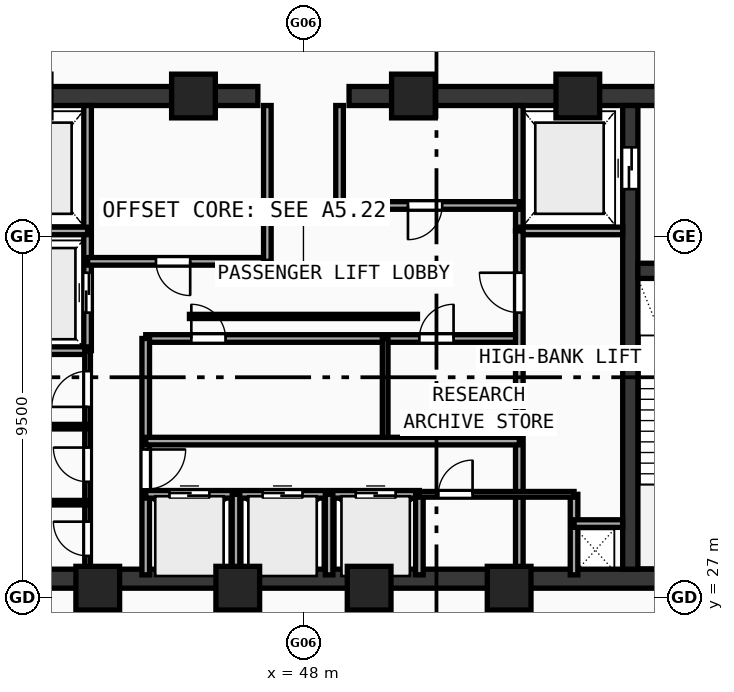
"""IFC4 building model, lengths in metres.
Left out: names, types, materials, properties, quantities, classifications, styles, units other than length and angle.
Written with IfcOpenShell. Run it as: python <this file> out.ifc"""

import sys

from ifc_helpers import new_model, si_unit, direction, frame, frame_2d, origin, origin_with_axes, origin_2d, place, context, subcontext, project, spatial, rectangle, hollow_rectangle, extrude, source, transform, mapped, element, fill, save


model = new_model("IFC4")
c1 = context("Model", 3, precision=1e-05, world=origin(), true_north=direction((0.0, 1.0)))
c2 = subcontext(c1, "Body", "Model", "MODEL_VIEW")
j1 = project(units=[si_unit("LENGTHUNIT", "METRE"), si_unit("PLANEANGLEUNIT", "RADIAN")], contexts=[c1])
p1 = place(None, origin())
s1 = spatial("IfcSite", under=j1, at=p1, CompositionType="ELEMENT")
p2 = place(p1, origin())
s2 = spatial("IfcBuilding", under=s1, at=p2, CompositionType="ELEMENT")
p3 = place(p2, frame((0.0, 0.0, 366.76)))
s3 = spatial("IfcBuildingStorey", under=s2, at=p3, CompositionType="ELEMENT", Elevation=366.76)
p4 = place(p3, frame((35.55, 27.5, 0.0), z_axis=(0.0, 0.0, 1.0), x_axis=(1.0, 0.0, 0.0)))
e1 = element("IfcWall", 1, at=p4, inside=s3, PredefinedType="SHEAR", context=c2, shape_type="SweptSolid", body=[
    extrude(rectangle(XDim=24.9, YDim=0.5, at=frame_2d((12.45, 0.0))), origin(), (0.0, 0.0, 1.0), 4.72),
])
p5 = place(p3, frame((35.55, 40.2, 0.0), z_axis=(0.0, 0.0, 1.0), x_axis=(1.0, 0.0, 0.0)))
e2 = element("IfcWall", 2, at=p5, inside=s3, PredefinedType="SHEAR", context=c2, shape_type="SweptSolid", body=[
    extrude(rectangle(XDim=11.25, YDim=0.5, at=frame_2d((5.625, 0.0))), origin(), (0.0, 0.0, 1.0), 4.72),
])
p6 = place(p5, frame((1.6, 0.0, 0.0)))
e3 = element("IfcOpeningElement", 3, at=p6, cuts=e2, PredefinedType="OPENING", context=c2, shape_type="SweptSolid", body=[
    extrude(rectangle(XDim=1.05, YDim=2.1, at=frame_2d((0.525, 1.05))), frame((0.0, 0.26, 0.0), z_axis=(0.0, -1.0, 0.0), x_axis=(1.0, 0.0, 0.0)), (0.0, 0.0, 1.0), 0.52),
])
p7 = place(p3, frame((49.2, 40.2, 0.0), z_axis=(0.0, 0.0, 1.0), x_axis=(1.0, 0.0, 0.0)))
e4 = element("IfcWall", 4, at=p7, inside=s3, PredefinedType="SHEAR", context=c2, shape_type="SweptSolid", body=[
    extrude(rectangle(XDim=11.25, YDim=0.5, at=frame_2d((5.625, 0.0))), origin(), (0.0, 0.0, 1.0), 4.72),
])
p8 = place(p7, frame((8.6, 0.0, 0.0)))
e5 = element("IfcOpeningElement", 5, at=p8, cuts=e4, PredefinedType="OPENING", context=c2, shape_type="SweptSolid", body=[
    extrude(rectangle(XDim=1.05, YDim=2.1, at=frame_2d((0.525, 1.05))), frame((0.0, 0.26, 0.0), z_axis=(0.0, -1.0, 0.0), x_axis=(1.0, 0.0, 0.0)), (0.0, 0.0, 1.0), 0.52),
])
p9 = place(p3, frame((56.6, 27.75, 0.0), z_axis=(0.0, 0.0, 1.0), x_axis=(0.0, 1.0, 0.0)))
e6 = element("IfcWall", 6, at=p9, inside=s3, PredefinedType="SHEAR", context=c2, shape_type="SweptSolid", body=[
    extrude(rectangle(XDim=12.2, YDim=0.4, at=frame_2d((6.1, 0.0))), origin(), (0.0, 0.0, 1.0), 4.72),
])
p10 = place(p9, frame((10.0, 0.0, 0.0)))
e7 = element("IfcOpeningElement", 7, at=p10, cuts=e6, PredefinedType="OPENING", context=c2, shape_type="SweptSolid", body=[
    extrude(rectangle(XDim=1.1, YDim=2.1, at=frame_2d((0.55, 1.05))), frame((0.0, 0.21, 0.0), z_axis=(0.0, -1.0, 0.0), x_axis=(1.0, 0.0, 0.0)), (0.0, 0.0, 1.0), 0.42),
])
p11 = place(p3, frame((56.8, 35.6, 0.0), z_axis=(0.0, 0.0, 1.0), x_axis=(1.0, 0.0, 0.0)))
e8 = element("IfcWall", 8, at=p11, inside=s3, PredefinedType="SHEAR", context=c2, shape_type="SweptSolid", body=[
    extrude(rectangle(XDim=3.15, YDim=0.4, at=frame_2d((1.575, 0.0))), origin(), (0.0, 0.0, 1.0), 4.72),
])
p12 = place(p11, frame((1.02, 0.0, 0.0)))
e9 = element("IfcOpeningElement", 9, at=p12, cuts=e8, PredefinedType="OPENING", context=c2, shape_type="SweptSolid", body=[
    extrude(rectangle(XDim=1.05, YDim=2.1, at=frame_2d((0.525, 1.05))), frame((0.0, 0.21, 0.0), z_axis=(0.0, -1.0, 0.0), x_axis=(1.0, 0.0, 0.0)), (0.0, 0.0, 1.0), 0.42),
])
m1 = source(origin(), c2, "Body", "SweptSolid", [
    extrude(hollow_rectangle(XDim=1.15, YDim=1.15, WallThickness=0.048, at=origin_2d()), origin(), (0.0, 0.0, 1.0), 5.0),
])
for number, where, z_axis, x_axis in (
    (10, (42.588, 27.25, -0.28), (0.0, 0.0, 1.0), (1.0, 0.0, 0.0)),
    (11, (46.272, 27.25, -0.28), (0.0, 0.0, 1.0), (1.0, 0.0, 0.0)),
    (12, (49.729, 27.25, -0.28), (0.0, 0.0, 1.0), (1.0, 0.0, 0.0)),
    (13, (53.412, 27.25, -0.28), (0.0, 0.0, 1.0), (1.0, 0.0, 0.0)),
    (14, (55.219, 40.2, -0.28), (0.0, 0.0, 1.0), (1.0, 0.0, 0.0)),
    (15, (50.894, 40.2, -0.28), (0.0, 0.0, 1.0), (1.0, 0.0, 0.0)),
    (16, (45.106, 40.2, -0.28), (0.0, 0.0, 1.0), (1.0, 0.0, 0.0)),
):
    element("IfcColumn", number, at=place(p3, frame(where, z_axis=z_axis, x_axis=x_axis)), inside=s3, PredefinedType="COLUMN", context=c2, shape_type="MappedRepresentation", body=[
        mapped(m1, transform((0.0, 0.0, 0.0), scale=1.0)),
    ])
p13 = place(p3, frame((42.32, 33.5, 0.0), z_axis=(0.0, 0.0, 1.0), x_axis=(0.0, 1.0, 0.0)))
e17 = element("IfcWall", 17, at=p13, inside=s3, PredefinedType="SOLIDWALL", context=c2, shape_type="SweptSolid", body=[
    extrude(rectangle(XDim=6.45, YDim=0.2, at=frame_2d((3.225, 0.0))), origin(), (0.0, 0.0, 1.0), 4.72),
])
p14 = place(p13, frame((1.0, 0.0, 0.0)))
e18 = element("IfcOpeningElement", 18, at=p14, cuts=e17, PredefinedType="OPENING", context=c2, shape_type="SweptSolid", body=[
    extrude(rectangle(XDim=1.05, YDim=2.1, at=frame_2d((0.525, 1.05))), frame((0.0, 0.11, 0.0), z_axis=(0.0, -1.0, 0.0), x_axis=(1.0, 0.0, 0.0)), (0.0, 0.0, 1.0), 0.22),
])
for number, where, z_axis, x_axis in (
    (19, (39.6, 36.65, 0.0), (0.0, 0.0, 1.0), (1.0, 0.0, 0.0)),
    (20, (39.6, 33.5, 0.0), (0.0, 0.0, 1.0), (1.0, 0.0, 0.0)),
):
    element("IfcWall", number, at=place(p3, frame(where, z_axis=z_axis, x_axis=x_axis)), inside=s3, PredefinedType="SOLIDWALL", context=c2, shape_type="SweptSolid", body=[
        extrude(rectangle(XDim=2.72, YDim=0.2, at=frame_2d((1.36, 0.0))), origin(), (0.0, 0.0, 1.0), 4.72),
    ])
p15 = place(p3, frame((53.68, 36.65, 0.0), z_axis=(0.0, 0.0, 1.0), x_axis=(0.0, 1.0, 0.0)))
e21 = element("IfcWall", 21, at=p15, inside=s3, PredefinedType="SOLIDWALL", context=c2, shape_type="SweptSolid", body=[
    extrude(rectangle(XDim=3.3, YDim=0.2, at=frame_2d((1.65, 0.0))), origin(), (0.0, 0.0, 1.0), 4.72),
])
p16 = place(p3, frame((53.68, 36.65, 0.0), z_axis=(0.0, 0.0, 1.0), x_axis=(1.0, 0.0, 0.0)))
e22 = element("IfcWall", 22, at=p16, inside=s3, PredefinedType="SOLIDWALL", context=c2, shape_type="SweptSolid", body=[
    extrude(rectangle(XDim=2.72, YDim=0.2, at=frame_2d((1.36, 0.0))), origin(), (0.0, 0.0, 1.0), 4.72),
])
p17 = place(p3, frame((42.32, 35.85, 0.0), z_axis=(0.0, 0.0, 1.0), x_axis=(1.0, 0.0, 0.0)))
e23 = element("IfcWall", 23, at=p17, inside=s3, PredefinedType="SOLIDWALL", context=c2, shape_type="SweptSolid", body=[
    extrude(rectangle(XDim=4.73, YDim=0.2, at=frame_2d((2.365, 0.0))), origin(), (0.0, 0.0, 1.0), 4.72),
])
p18 = place(p17, frame((1.8, 0.0, 0.0)))
e24 = element("IfcOpeningElement", 24, at=p18, cuts=e23, PredefinedType="OPENING", context=c2, shape_type="SweptSolid", body=[
    extrude(rectangle(XDim=0.9, YDim=2.1, at=frame_2d((0.45, 1.05))), frame((0.0, 0.11, 0.0), z_axis=(0.0, -1.0, 0.0), x_axis=(1.0, 0.0, 0.0)), (0.0, 0.0, 1.0), 0.22),
])
p19 = place(p3, frame((48.95, 37.32, 0.0), z_axis=(0.0, 0.0, 1.0), x_axis=(1.0, 0.0, 0.0)))
e25 = element("IfcWall", 25, at=p19, inside=s3, PredefinedType="SOLIDWALL", context=c2, shape_type="SweptSolid", body=[
    extrude(rectangle(XDim=4.73, YDim=0.2, at=frame_2d((2.365, 0.0))), origin(), (0.0, 0.0, 1.0), 4.72),
])
p20 = place(p19, frame((1.8, 0.0, 0.0)))
e26 = element("IfcOpeningElement", 26, at=p20, cuts=e25, PredefinedType="OPENING", context=c2, shape_type="SweptSolid", body=[
    extrude(rectangle(XDim=0.9, YDim=2.1, at=frame_2d((0.45, 1.05))), frame((0.0, 0.11, 0.0), z_axis=(0.0, -1.0, 0.0), x_axis=(1.0, 0.0, 0.0)), (0.0, 0.0, 1.0), 0.22),
])
p21 = place(p3, frame((47.05, 35.85, 0.0), z_axis=(0.0, 0.0, 1.0), x_axis=(0.0, 1.0, 0.0)))
e27 = element("IfcWall", 27, at=p21, inside=s3, PredefinedType="SOLIDWALL", context=c2, shape_type="SweptSolid", body=[
    extrude(rectangle(XDim=4.1, YDim=0.2, at=frame_2d((2.05, 0.0))), origin(), (0.0, 0.0, 1.0), 4.72),
])
p22 = place(p3, frame((48.95, 37.32, 0.0), z_axis=(0.0, 0.0, 1.0), x_axis=(0.0, 1.0, 0.0)))
e28 = element("IfcWall", 28, at=p22, inside=s3, PredefinedType="SOLIDWALL", context=c2, shape_type="SweptSolid", body=[
    extrude(rectangle(XDim=2.63, YDim=0.2, at=frame_2d((1.315, 0.0))), origin(), (0.0, 0.0, 1.0), 4.72),
])
p23 = place(p3, frame((43.85, 33.82, 0.0), z_axis=(0.0, 0.0, 1.0), x_axis=(1.0, 0.0, 0.0)))
e29 = element("IfcWall", 29, at=p23, inside=s3, PredefinedType="SOLIDWALL", context=c2, shape_type="SweptSolid", body=[
    extrude(rectangle(XDim=9.83, YDim=0.2, at=frame_2d((4.915, 0.0))), origin(), (0.0, 0.0, 1.0), 4.72),
])
p24 = place(p23, frame((1.2, 0.0, 0.0)))
e30 = element("IfcOpeningElement", 30, at=p24, cuts=e29, PredefinedType="OPENING", context=c2, shape_type="SweptSolid", body=[
    extrude(rectangle(XDim=0.9, YDim=2.1, at=frame_2d((0.45, 1.05))), frame((0.0, 0.11, 0.0), z_axis=(0.0, -1.0, 0.0), x_axis=(1.0, 0.0, 0.0)), (0.0, 0.0, 1.0), 0.22),
])
p25 = place(p23, frame((7.2, 0.0, 0.0)))
e31 = element("IfcOpeningElement", 31, at=p25, cuts=e29, PredefinedType="OPENING", context=c2, shape_type="SweptSolid", body=[
    extrude(rectangle(XDim=0.9, YDim=2.1, at=frame_2d((0.45, 1.05))), frame((0.0, 0.11, 0.0), z_axis=(0.0, -1.0, 0.0), x_axis=(1.0, 0.0, 0.0)), (0.0, 0.0, 1.0), 0.22),
])
p26 = place(p3, frame((43.85, 27.6, 0.0), z_axis=(0.0, 0.0, 1.0), x_axis=(0.0, 1.0, 0.0)))
e32 = element("IfcWall", 32, at=p26, inside=s3, PredefinedType="SOLIDWALL", context=c2, shape_type="SweptSolid", body=[
    extrude(rectangle(XDim=6.22, YDim=0.2, at=frame_2d((3.11, 0.0))), origin(), (0.0, 0.0, 1.0), 4.72),
])
p27 = place(p26, frame((2.25, 0.0, 0.0)))
e33 = element("IfcOpeningElement", 33, at=p27, cuts=e32, PredefinedType="OPENING", context=c2, shape_type="SweptSolid", body=[
    extrude(rectangle(XDim=1.05, YDim=2.1, at=frame_2d((0.525, 1.05))), frame((0.0, 0.11, 0.0), z_axis=(0.0, -1.0, 0.0), x_axis=(1.0, 0.0, 0.0)), (0.0, 0.0, 1.0), 0.22),
])
p28 = place(p3, frame((53.68, 27.6, 0.0), z_axis=(0.0, 0.0, 1.0), x_axis=(0.0, 1.0, 0.0)))
e34 = element("IfcWall", 34, at=p28, inside=s3, PredefinedType="SOLIDWALL", context=c2, shape_type="SweptSolid", body=[
    extrude(rectangle(XDim=9.05, YDim=0.2, at=frame_2d((4.525, 0.0))), origin(), (0.0, 0.0, 1.0), 4.72),
])
p29 = place(p28, frame((6.9, 0.0, 0.0)))
e35 = element("IfcOpeningElement", 35, at=p29, cuts=e34, PredefinedType="OPENING", context=c2, shape_type="SweptSolid", body=[
    extrude(rectangle(XDim=1.05, YDim=2.1, at=frame_2d((0.525, 1.05))), frame((0.0, 0.11, 0.0), z_axis=(0.0, -1.0, 0.0), x_axis=(1.0, 0.0, 0.0)), (0.0, 0.0, 1.0), 0.22),
])
p30 = place(p3, frame((50.15, 31.12, 0.0), z_axis=(0.0, 0.0, 1.0), x_axis=(0.0, 1.0, 0.0)))
e36 = element("IfcWall", 36, at=p30, inside=s3, PredefinedType="PARTITIONING", context=c2, shape_type="SweptSolid", body=[
    extrude(rectangle(XDim=2.7, YDim=0.15, at=frame_2d((1.35, 0.0))), origin(), (0.0, 0.0, 1.0), 4.72),
])
p31 = place(p3, frame((43.85, 29.72, 0.0), z_axis=(0.0, 0.0, 1.0), x_axis=(1.0, 0.0, 0.0)))
e37 = element("IfcWall", 37, at=p31, inside=s3, PredefinedType="SOLIDWALL", context=c2, shape_type="SweptSolid", body=[
    extrude(rectangle(XDim=7.2, YDim=0.2, at=frame_2d((3.6, 0.0))), origin(), (0.0, 0.0, 1.0), 4.72),
])
p32 = place(p31, frame((0.625, 0.0, 0.0)))
e38 = element("IfcOpeningElement", 38, at=p32, cuts=e37, PredefinedType="OPENING", context=c2, shape_type="SweptSolid", body=[
    extrude(rectangle(XDim=1.05, YDim=2.1, at=frame_2d((0.525, 1.05))), frame((0.0, 0.11, 0.0), z_axis=(0.0, -1.0, 0.0), x_axis=(1.0, 0.0, 0.0)), (0.0, 0.0, 1.0), 0.22),
])
p33 = place(p31, frame((3.075, 0.0, 0.0)))
e39 = element("IfcOpeningElement", 39, at=p33, cuts=e37, PredefinedType="OPENING", context=c2, shape_type="SweptSolid", body=[
    extrude(rectangle(XDim=1.05, YDim=2.1, at=frame_2d((0.525, 1.05))), frame((0.0, 0.11, 0.0), z_axis=(0.0, -1.0, 0.0), x_axis=(1.0, 0.0, 0.0)), (0.0, 0.0, 1.0), 0.22),
])
p34 = place(p31, frame((5.525, 0.0, 0.0)))
e40 = element("IfcOpeningElement", 40, at=p34, cuts=e37, PredefinedType="OPENING", context=c2, shape_type="SweptSolid", body=[
    extrude(rectangle(XDim=1.05, YDim=2.1, at=frame_2d((0.525, 1.05))), frame((0.0, 0.11, 0.0), z_axis=(0.0, -1.0, 0.0), x_axis=(1.0, 0.0, 0.0)), (0.0, 0.0, 1.0), 0.22),
])
p35 = place(p3, frame((51.05, 27.6, 0.0), z_axis=(0.0, 0.0, 1.0), x_axis=(0.0, 1.0, 0.0)))
e41 = element("IfcWall", 41, at=p35, inside=s3, PredefinedType="SOLIDWALL", context=c2, shape_type="SweptSolid", body=[
    extrude(rectangle(XDim=2.12, YDim=0.2, at=frame_2d((1.06, 0.0))), origin(), (0.0, 0.0, 1.0), 4.72),
])
p36 = place(p3, frame((43.85, 31.12, 0.0), z_axis=(0.0, 0.0, 1.0), x_axis=(1.0, 0.0, 0.0)))
e42 = element("IfcWall", 42, at=p36, inside=s3, PredefinedType="SOLIDWALL", context=c2, shape_type="SweptSolid", body=[
    extrude(rectangle(XDim=9.83, YDim=0.2, at=frame_2d((4.915, 0.0))), origin(), (0.0, 0.0, 1.0), 4.72),
])
for number, where, z_axis, x_axis in (
    (43, (46.225, 27.6, 0.0), (0.0, 0.0, 1.0), (0.0, 1.0, 0.0)),
    (44, (48.675, 27.6, 0.0), (0.0, 0.0, 1.0), (0.0, 1.0, 0.0)),
    (45, (55.12, 27.6, 0.0), (0.0, 0.0, 1.0), (0.0, 1.0, 0.0)),
):
    element("IfcWall", number, at=place(p3, frame(where, z_axis=z_axis, x_axis=x_axis)), inside=s3, PredefinedType="SOLIDWALL", context=c2, shape_type="SweptSolid", body=[
        extrude(rectangle(XDim=2.12, YDim=0.2, at=frame_2d((1.06, 0.0))), origin(), (0.0, 0.0, 1.0), 4.72),
    ])
p37 = place(p3, frame((55.12, 28.95, 0.0), z_axis=(0.0, 0.0, 1.0), x_axis=(1.0, 0.0, 0.0)))
e46 = element("IfcWall", 46, at=p37, inside=s3, PredefinedType="SOLIDWALL", context=c2, shape_type="SweptSolid", body=[
    extrude(rectangle(XDim=1.28, YDim=0.2, at=frame_2d((0.64, 0.0))), origin(), (0.0, 0.0, 1.0), 4.72),
])
p38 = place(p3, frame((42.32, 27.6, 0.0), z_axis=(0.0, 0.0, 1.0), x_axis=(0.0, 1.0, 0.0)))
e47 = element("IfcWall", 47, at=p38, inside=s3, PredefinedType="PARTITIONING", context=c2, shape_type="SweptSolid", body=[
    extrude(rectangle(XDim=5.9, YDim=0.15, at=frame_2d((2.95, 0.0))), origin(), (0.0, 0.0, 1.0), 4.72),
])
p39 = place(p38, frame((0.5, 0.0, 0.0)))
e48 = element("IfcOpeningElement", 48, at=p39, cuts=e47, PredefinedType="OPENING", context=c2, shape_type="SweptSolid", body=[
    extrude(rectangle(XDim=0.9, YDim=2.1, at=frame_2d((0.45, 1.05))), frame((0.0, 0.085, 0.0), z_axis=(0.0, -1.0, 0.0), x_axis=(1.0, 0.0, 0.0)), (0.0, 0.0, 1.0), 0.17),
])
p40 = place(p38, frame((2.45, 0.0, 0.0)))
e49 = element("IfcOpeningElement", 49, at=p40, cuts=e47, PredefinedType="OPENING", context=c2, shape_type="SweptSolid", body=[
    extrude(rectangle(XDim=0.9, YDim=2.1, at=frame_2d((0.45, 1.05))), frame((0.0, 0.085, 0.0), z_axis=(0.0, -1.0, 0.0), x_axis=(1.0, 0.0, 0.0)), (0.0, 0.0, 1.0), 0.17),
])
p41 = place(p38, frame((4.42, 0.0, 0.0)))
e50 = element("IfcOpeningElement", 50, at=p41, cuts=e47, PredefinedType="OPENING", context=c2, shape_type="SweptSolid", body=[
    extrude(rectangle(XDim=0.94, YDim=2.1, at=frame_2d((0.47, 1.05))), frame((0.0, 0.085, 0.0), z_axis=(0.0, -1.0, 0.0), x_axis=(1.0, 0.0, 0.0)), (0.0, 0.0, 1.0), 0.17),
])
p42 = place(p3, frame((51.05, 29.72, 0.0), z_axis=(0.0, 0.0, 1.0), x_axis=(1.0, 0.0, 0.0)))
e51 = element("IfcWall", 51, at=p42, inside=s3, PredefinedType="PARTITIONING", context=c2, shape_type="SweptSolid", body=[
    extrude(rectangle(XDim=4.07, YDim=0.15, at=frame_2d((2.035, 0.0))), origin(), (0.0, 0.0, 1.0), 4.72),
])
p43 = place(p42, frame((0.5, 0.0, 0.0)))
e52 = element("IfcOpeningElement", 52, at=p43, cuts=e51, PredefinedType="OPENING", context=c2, shape_type="SweptSolid", body=[
    extrude(rectangle(XDim=0.9, YDim=2.1, at=frame_2d((0.45, 1.05))), frame((0.0, 0.085, 0.0), z_axis=(0.0, -1.0, 0.0), x_axis=(1.0, 0.0, 0.0)), (0.0, 0.0, 1.0), 0.17),
])
for number, where, z_axis, x_axis in (
    (53, (39.6, 29.5, 0.0), (0.0, 0.0, 1.0), (1.0, 0.0, 0.0)),
    (54, (39.6, 31.5, 0.0), (0.0, 0.0, 1.0), (1.0, 0.0, 0.0)),
):
    element("IfcWall", number, at=place(p3, frame(where, z_axis=z_axis, x_axis=x_axis)), inside=s3, PredefinedType="PARTITIONING", context=c2, shape_type="SweptSolid", body=[
        extrude(rectangle(XDim=2.72, YDim=0.12, at=frame_2d((1.36, 0.0))), origin(), (0.0, 0.0, 1.0), 4.72),
    ])
p44 = place(p3, frame((45.0, 34.4, 0.0), z_axis=(0.0, 0.0, 1.0), x_axis=(1.0, 0.0, 0.0)))
e55 = element("IfcWall", 55, at=p44, inside=s3, PredefinedType="MOVABLE", context=c2, shape_type="SweptSolid", body=[
    extrude(rectangle(XDim=6.0, YDim=0.11, at=frame_2d((3.0, 0.0))), origin(), (0.0, 0.0, 1.0), 2.5),
])
m2 = source(origin(), c2, "Body", "SweptSolid", [
    extrude(rectangle(XDim=1.1, YDim=2.1, at=frame_2d((0.55, 1.05))), frame((0.0, 0.025, 0.0), z_axis=(0.0, -1.0, 0.0), x_axis=(1.0, 0.0, 0.0)), (0.0, 0.0, 1.0), 0.05),
])
p45 = place(p10, origin_with_axes())
e56 = element("IfcDoor", 56, at=p45, inside=s3, OperationType="DOUBLE_DOOR_SLIDING", PredefinedType="DOOR", context=c2, shape_type="MappedRepresentation", body=[
    mapped(m2, transform((0.0, 0.0, 0.0), scale=1.0)),
])
fill(e7, e56)
m3 = source(origin(), c2, "Body", "SweptSolid", [
    extrude(rectangle(XDim=1.05, YDim=2.1, at=frame_2d((0.525, 1.05))), frame((0.0, 0.025, 0.0), z_axis=(0.0, -1.0, 0.0), x_axis=(1.0, 0.0, 0.0)), (0.0, 0.0, 1.0), 0.05),
])
p46 = place(p14, origin_with_axes())
e57 = element("IfcDoor", 57, at=p46, inside=s3, OperationType="DOUBLE_DOOR_SLIDING", PredefinedType="DOOR", context=c2, shape_type="MappedRepresentation", body=[
    mapped(m3, transform((0.0, 0.0, 0.0), scale=1.0)),
])
fill(e18, e57)
m4 = source(origin(), c2, "Body", "SweptSolid", [
    extrude(rectangle(XDim=0.9, YDim=2.1, at=frame_2d((0.45, 1.05))), frame((0.0, 0.025, 0.0), z_axis=(0.0, -1.0, 0.0), x_axis=(1.0, 0.0, 0.0)), (0.0, 0.0, 1.0), 0.05),
])
p47 = place(p18, frame((0.9, 0.0, 0.0), z_axis=(0.0, 0.0, 1.0), x_axis=(-1.0, 0.0, 0.0)))
e58 = element("IfcDoor", 58, at=p47, inside=s3, OperationType="SINGLE_SWING_LEFT", PredefinedType="DOOR", context=c2, shape_type="MappedRepresentation", body=[
    mapped(m4, transform((0.0, 0.0, 0.0), scale=1.0)),
])
fill(e24, e58)
p48 = place(p20, frame((0.9, 0.0, 0.0), z_axis=(0.0, 0.0, 1.0), x_axis=(-1.0, 0.0, 0.0)))
e59 = element("IfcDoor", 59, at=p48, inside=s3, OperationType="SINGLE_SWING_RIGHT", PredefinedType="DOOR", context=c2, shape_type="MappedRepresentation", body=[
    mapped(m4, transform((0.0, 0.0, 0.0), scale=1.0)),
])
fill(e26, e59)
p49 = place(p24, origin_with_axes())
e60 = element("IfcDoor", 60, at=p49, inside=s3, OperationType="SINGLE_SWING_LEFT", PredefinedType="DOOR", context=c2, shape_type="MappedRepresentation", body=[
    mapped(m4, transform((0.0, 0.0, 0.0), scale=1.0)),
])
fill(e30, e60)
p50 = place(p25, origin_with_axes())
e61 = element("IfcDoor", 61, at=p50, inside=s3, OperationType="SINGLE_SWING_RIGHT", PredefinedType="DOOR", context=c2, shape_type="MappedRepresentation", body=[
    mapped(m4, transform((0.0, 0.0, 0.0), scale=1.0)),
])
fill(e31, e61)
p51 = place(p27, frame((1.05, 0.0, 0.0), z_axis=(0.0, 0.0, 1.0), x_axis=(-1.0, 0.0, 0.0)))
e62 = element("IfcDoor", 62, at=p51, inside=s3, OperationType="SINGLE_SWING_LEFT", PredefinedType="DOOR", context=c2, shape_type="MappedRepresentation", body=[
    mapped(m3, transform((0.0, 0.0, 0.0), scale=1.0)),
])
fill(e33, e62)
p52 = place(p29, origin_with_axes())
e63 = element("IfcDoor", 63, at=p52, inside=s3, OperationType="SINGLE_SWING_RIGHT", PredefinedType="DOOR", context=c2, shape_type="MappedRepresentation", body=[
    mapped(m3, transform((0.0, 0.0, 0.0), scale=1.0)),
])
fill(e35, e63)
p53 = place(p32, origin_with_axes())
e64 = element("IfcDoor", 64, at=p53, inside=s3, OperationType="DOUBLE_DOOR_SLIDING", PredefinedType="DOOR", context=c2, shape_type="MappedRepresentation", body=[
    mapped(m3, transform((0.0, 0.0, 0.0), scale=1.0)),
])
fill(e38, e64)
p54 = place(p33, origin_with_axes())
e65 = element("IfcDoor", 65, at=p54, inside=s3, OperationType="DOUBLE_DOOR_SLIDING", PredefinedType="DOOR", context=c2, shape_type="MappedRepresentation", body=[
    mapped(m3, transform((0.0, 0.0, 0.0), scale=1.0)),
])
fill(e39, e65)
p55 = place(p34, origin_with_axes())
e66 = element("IfcDoor", 66, at=p55, inside=s3, OperationType="DOUBLE_DOOR_SLIDING", PredefinedType="DOOR", context=c2, shape_type="MappedRepresentation", body=[
    mapped(m3, transform((0.0, 0.0, 0.0), scale=1.0)),
])
fill(e40, e66)
p56 = place(p39, origin_with_axes())
e67 = element("IfcDoor", 67, at=p56, inside=s3, OperationType="SINGLE_SWING_RIGHT", PredefinedType="DOOR", context=c2, shape_type="MappedRepresentation", body=[
    mapped(m4, transform((0.0, 0.0, 0.0), scale=1.0)),
])
fill(e48, e67)
p57 = place(p40, origin_with_axes())
e68 = element("IfcDoor", 68, at=p57, inside=s3, OperationType="SINGLE_SWING_RIGHT", PredefinedType="DOOR", context=c2, shape_type="MappedRepresentation", body=[
    mapped(m4, transform((0.0, 0.0, 0.0), scale=1.0)),
])
fill(e49, e68)
m5 = source(origin(), c2, "Body", "SweptSolid", [
    extrude(rectangle(XDim=0.94, YDim=2.1, at=frame_2d((0.47, 1.05))), frame((0.0, 0.025, 0.0), z_axis=(0.0, -1.0, 0.0), x_axis=(1.0, 0.0, 0.0)), (0.0, 0.0, 1.0), 0.05),
])
p58 = place(p41, origin_with_axes())
e69 = element("IfcDoor", 69, at=p58, inside=s3, OperationType="SINGLE_SWING_LEFT", PredefinedType="DOOR", context=c2, shape_type="MappedRepresentation", body=[
    mapped(m5, transform((0.0, 0.0, 0.0), scale=1.0)),
])
fill(e50, e69)
p59 = place(p43, origin_with_axes())
e70 = element("IfcDoor", 70, at=p59, inside=s3, OperationType="SINGLE_SWING_RIGHT", PredefinedType="DOOR", context=c2, shape_type="MappedRepresentation", body=[
    mapped(m4, transform((0.0, 0.0, 0.0), scale=1.0)),
])
fill(e52, e70)
save(model, sys.argv[1])
